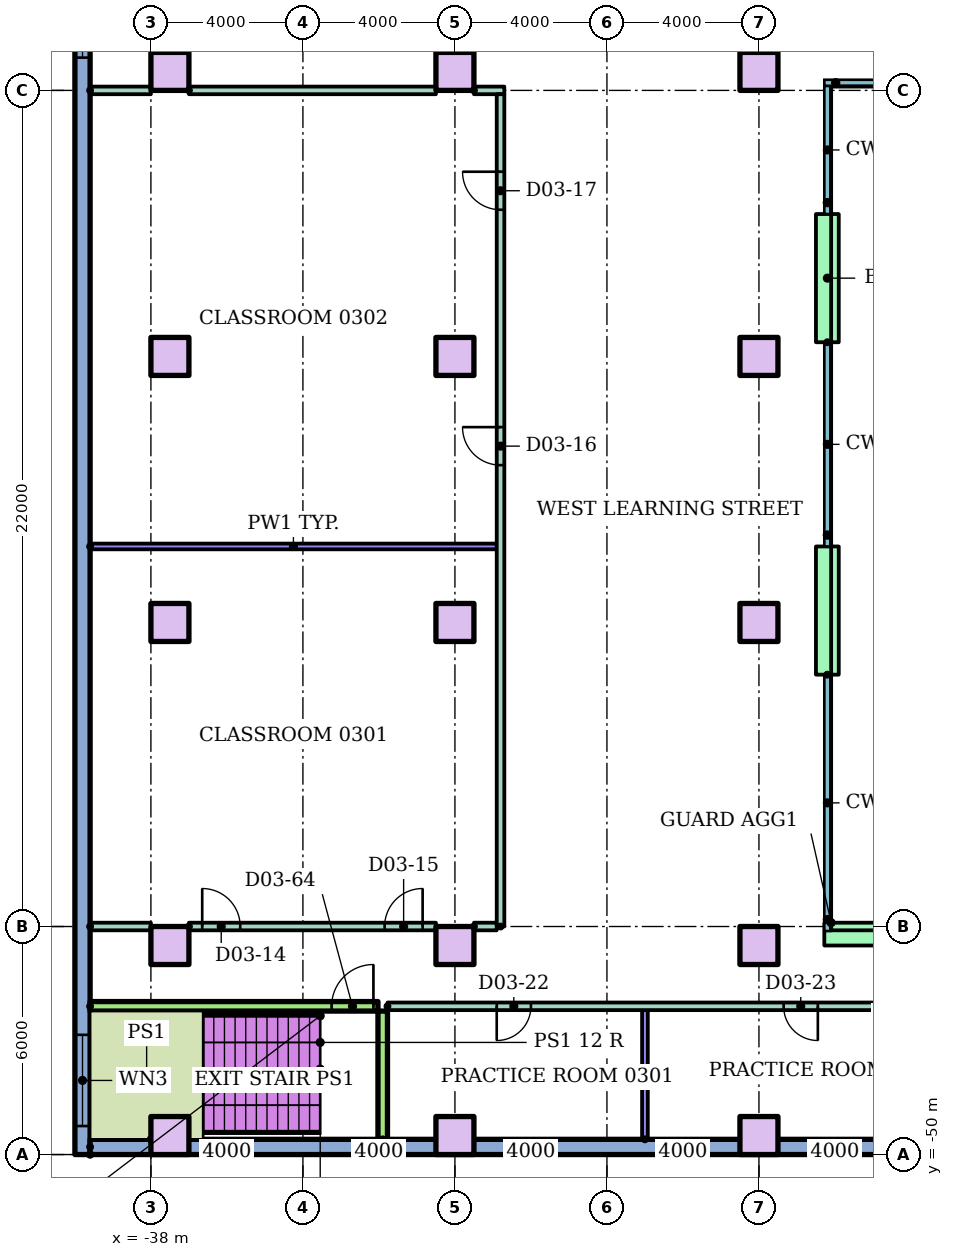
"""IFC4 building model, lengths in metres.
Left out: names, types, materials, properties, quantities, classifications, styles, units other than length and angle.
Written with IfcOpenShell. Run it as: python <this file> out.ifc"""

import sys

from ifc_helpers import new_model, si_unit, direction, frame, frame_2d, origin, origin_2d, place, context, subcontext, project, spatial, rectangle, extrude, element, fill, save


model = new_model("IFC4")
c1 = context("Model", 3, precision=1e-05, world=origin(), true_north=direction((0.0, 1.0)))
c2 = subcontext(c1, "Body", "Model", "MODEL_VIEW")
j1 = project(units=[si_unit("LENGTHUNIT", "METRE"), si_unit("PLANEANGLEUNIT", "RADIAN")], contexts=[c1])
p1 = place(None, origin())
s1 = spatial("IfcSite", under=j1, at=p1, CompositionType="ELEMENT")
p2 = place(p1, origin())
s2 = spatial("IfcBuilding", under=s1, at=p2, CompositionType="ELEMENT")
p3 = place(p2, frame((0.0, 0.0, 14.0)))
s3 = spatial("IfcBuildingStorey", under=s2, at=p3, CompositionType="ELEMENT", Elevation=14.0)
for number, where in (
    (1, (-37.5, -49.5, 0.0)),
    (2, (-30.0, -49.5, 0.0)),
    (3, (-22.0, -49.5, 0.0)),
    (4, (-37.5, -44.5, 0.0)),
    (5, (-30.0, -44.5, 0.0)),
    (6, (-22.0, -44.5, 0.0)),
    (7, (-37.5, -36.0, 0.0)),
    (8, (-30.0, -36.0, 0.0)),
    (9, (-22.0, -36.0, 0.0)),
    (10, (-37.5, -29.0, 0.0)),
    (11, (-30.0, -29.0, 0.0)),
    (12, (-22.0, -29.0, 0.0)),
    (13, (-37.5, -21.5, 0.0)),
    (14, (-30.0, -21.5, 0.0)),
    (15, (-22.0, -21.5, 0.0)),
):
    element("IfcColumn", number, at=place(p3, frame(where)), inside=s3, PredefinedType="COLUMN", context=c2, shape_type="SweptSolid", body=[
        extrude(rectangle(XDim=1.0, YDim=1.0, at=origin_2d()), origin(), (0.0, 0.0, 1.0), 4.0),
    ])
p4 = place(p3, frame((-39.8, 20.0, 0.0), z_axis=(0.0, 0.0, 1.0), x_axis=(0.0, -1.0, 0.0)))
e16 = element("IfcWall", 16, at=p4, inside=s3, PredefinedType="STANDARD", context=c2, shape_type="SweptSolid", body=[
    extrude(rectangle(XDim=70.0, YDim=0.4, at=frame_2d((35.0, 0.0))), origin(), (0.0, 0.0, 1.0), 3.7),
])
p5 = place(p4, frame((1.05, 0.0, 0.9)))
e17 = element("IfcOpeningElement", 17, at=p5, cuts=e16, PredefinedType="OPENING", context=c2, shape_type="SweptSolid", body=[
    extrude(rectangle(XDim=2.4, YDim=2.1, at=frame_2d((1.2, 1.05))), frame((0.0, 0.21, 0.0), z_axis=(0.0, -1.0, 0.0), x_axis=(1.0, 0.0, 0.0)), (0.0, 0.0, 1.0), 0.42),
])
p6 = place(p4, frame((5.55, 0.0, 0.9)))
e18 = element("IfcOpeningElement", 18, at=p6, cuts=e16, PredefinedType="OPENING", context=c2, shape_type="SweptSolid", body=[
    extrude(rectangle(XDim=2.4, YDim=2.1, at=frame_2d((1.2, 1.05))), frame((0.0, 0.21, 0.0), z_axis=(0.0, -1.0, 0.0), x_axis=(1.0, 0.0, 0.0)), (0.0, 0.0, 1.0), 0.42),
])
p7 = place(p4, frame((9.863, 0.0, 0.9)))
e19 = element("IfcOpeningElement", 19, at=p7, cuts=e16, PredefinedType="OPENING", context=c2, shape_type="SweptSolid", body=[
    extrude(rectangle(XDim=2.4, YDim=2.1, at=frame_2d((1.2, 1.05))), frame((0.0, 0.21, 0.0), z_axis=(0.0, -1.0, 0.0), x_axis=(1.0, 0.0, 0.0)), (0.0, 0.0, 1.0), 0.42),
])
p8 = place(p4, frame((13.988, 0.0, 0.9)))
e20 = element("IfcOpeningElement", 20, at=p8, cuts=e16, PredefinedType="OPENING", context=c2, shape_type="SweptSolid", body=[
    extrude(rectangle(XDim=2.4, YDim=2.1, at=frame_2d((1.2, 1.05))), frame((0.0, 0.21, 0.0), z_axis=(0.0, -1.0, 0.0), x_axis=(1.0, 0.0, 0.0)), (0.0, 0.0, 1.0), 0.42),
])
p9 = place(p4, frame((18.113, 0.0, 0.9)))
e21 = element("IfcOpeningElement", 21, at=p9, cuts=e16, PredefinedType="OPENING", context=c2, shape_type="SweptSolid", body=[
    extrude(rectangle(XDim=2.4, YDim=2.1, at=frame_2d((1.2, 1.05))), frame((0.0, 0.21, 0.0), z_axis=(0.0, -1.0, 0.0), x_axis=(1.0, 0.0, 0.0)), (0.0, 0.0, 1.0), 0.42),
])
p10 = place(p4, frame((22.238, 0.0, 0.9)))
e22 = element("IfcOpeningElement", 22, at=p10, cuts=e16, PredefinedType="OPENING", context=c2, shape_type="SweptSolid", body=[
    extrude(rectangle(XDim=2.4, YDim=2.1, at=frame_2d((1.2, 1.05))), frame((0.0, 0.21, 0.0), z_axis=(0.0, -1.0, 0.0), x_axis=(1.0, 0.0, 0.0)), (0.0, 0.0, 1.0), 0.42),
])
p11 = place(p4, frame((26.363, 0.0, 0.9)))
e23 = element("IfcOpeningElement", 23, at=p11, cuts=e16, PredefinedType="OPENING", context=c2, shape_type="SweptSolid", body=[
    extrude(rectangle(XDim=2.4, YDim=2.1, at=frame_2d((1.2, 1.05))), frame((0.0, 0.21, 0.0), z_axis=(0.0, -1.0, 0.0), x_axis=(1.0, 0.0, 0.0)), (0.0, 0.0, 1.0), 0.42),
])
p12 = place(p4, frame((30.488, 0.0, 0.9)))
e24 = element("IfcOpeningElement", 24, at=p12, cuts=e16, PredefinedType="OPENING", context=c2, shape_type="SweptSolid", body=[
    extrude(rectangle(XDim=2.4, YDim=2.1, at=frame_2d((1.2, 1.05))), frame((0.0, 0.21, 0.0), z_axis=(0.0, -1.0, 0.0), x_axis=(1.0, 0.0, 0.0)), (0.0, 0.0, 1.0), 0.42),
])
p13 = place(p4, frame((34.613, 0.0, 0.9)))
e25 = element("IfcOpeningElement", 25, at=p13, cuts=e16, PredefinedType="OPENING", context=c2, shape_type="SweptSolid", body=[
    extrude(rectangle(XDim=2.4, YDim=2.1, at=frame_2d((1.2, 1.05))), frame((0.0, 0.21, 0.0), z_axis=(0.0, -1.0, 0.0), x_axis=(1.0, 0.0, 0.0)), (0.0, 0.0, 1.0), 0.42),
])
p14 = place(p4, frame((38.738, 0.0, 0.9)))
e26 = element("IfcOpeningElement", 26, at=p14, cuts=e16, PredefinedType="OPENING", context=c2, shape_type="SweptSolid", body=[
    extrude(rectangle(XDim=2.4, YDim=2.1, at=frame_2d((1.2, 1.05))), frame((0.0, 0.21, 0.0), z_axis=(0.0, -1.0, 0.0), x_axis=(1.0, 0.0, 0.0)), (0.0, 0.0, 1.0), 0.42),
])
p15 = place(p4, frame((66.85, 0.0, 0.9)))
e27 = element("IfcOpeningElement", 27, at=p15, cuts=e16, PredefinedType="OPENING", context=c2, shape_type="SweptSolid", body=[
    extrude(rectangle(XDim=2.4, YDim=2.1, at=frame_2d((1.2, 1.05))), frame((0.0, 0.21, 0.0), z_axis=(0.0, -1.0, 0.0), x_axis=(1.0, 0.0, 0.0)), (0.0, 0.0, 1.0), 0.42),
])
p16 = place(p3, frame((-39.6, -49.8, 0.0)))
e28 = element("IfcWall", 28, at=p16, inside=s3, PredefinedType="STANDARD", context=c2, shape_type="SweptSolid", body=[
    extrude(rectangle(XDim=79.2, YDim=0.4, at=frame_2d((39.6, 0.0))), origin(), (0.0, 0.0, 1.0), 3.7),
])
p17 = place(p16, frame((21.885, 0.0, 0.9)))
e29 = element("IfcOpeningElement", 29, at=p17, cuts=e28, PredefinedType="OPENING", context=c2, shape_type="SweptSolid", body=[
    extrude(rectangle(XDim=2.4, YDim=2.1, at=frame_2d((1.2, 1.05))), frame((0.0, 0.21, 0.0), z_axis=(0.0, -1.0, 0.0), x_axis=(1.0, 0.0, 0.0)), (0.0, 0.0, 1.0), 0.42),
])
p18 = place(p16, frame((30.135, 0.0, 0.9)))
e30 = element("IfcOpeningElement", 30, at=p18, cuts=e28, PredefinedType="OPENING", context=c2, shape_type="SweptSolid", body=[
    extrude(rectangle(XDim=2.05, YDim=2.1, at=frame_2d((1.025, 1.05))), frame((0.0, 0.21, 0.0), z_axis=(0.0, -1.0, 0.0), x_axis=(1.0, 0.0, 0.0)), (0.0, 0.0, 1.0), 0.42),
])
p19 = place(p16, frame((38.135, 0.0, 0.9)))
e31 = element("IfcOpeningElement", 31, at=p19, cuts=e28, PredefinedType="OPENING", context=c2, shape_type="SweptSolid", body=[
    extrude(rectangle(XDim=2.4, YDim=2.1, at=frame_2d((1.2, 1.05))), frame((0.0, 0.21, 0.0), z_axis=(0.0, -1.0, 0.0), x_axis=(1.0, 0.0, 0.0)), (0.0, 0.0, 1.0), 0.42),
])
p20 = place(p16, frame((47.015, 0.0, 0.9)))
e32 = element("IfcOpeningElement", 32, at=p20, cuts=e28, PredefinedType="OPENING", context=c2, shape_type="SweptSolid", body=[
    extrude(rectangle(XDim=1.52, YDim=2.1, at=frame_2d((0.76, 1.05))), frame((0.0, 0.21, 0.0), z_axis=(0.0, -1.0, 0.0), x_axis=(1.0, 0.0, 0.0)), (0.0, 0.0, 1.0), 0.42),
])
p21 = place(p16, frame((54.135, 0.0, 0.9)))
e33 = element("IfcOpeningElement", 33, at=p21, cuts=e28, PredefinedType="OPENING", context=c2, shape_type="SweptSolid", body=[
    extrude(rectangle(XDim=2.4, YDim=2.1, at=frame_2d((1.2, 1.05))), frame((0.0, 0.21, 0.0), z_axis=(0.0, -1.0, 0.0), x_axis=(1.0, 0.0, 0.0)), (0.0, 0.0, 1.0), 0.42),
])
p22 = place(p3, frame((-18.0, -44.2, 0.0), z_axis=(0.0, 0.0, 1.0), x_axis=(-1.0, 0.0, 0.0)))
e34 = element("IfcWall", 34, at=p22, inside=s3, PredefinedType="STANDARD", context=c2, shape_type="SweptSolid", body=[
    extrude(rectangle(XDim=2.28, YDim=0.6, at=frame_2d((1.14, 0.0))), origin(), (0.0, 0.0, 1.0), 3.7),
])
for number, where, z_axis, x_axis in (
    (35, (-20.2, -37.373, 0.0), (0.0, 0.0, 1.0), (0.0, 1.0, 0.0)),
    (36, (-20.2, -28.627, 0.0), (0.0, 0.0, 1.0), (0.0, 1.0, 0.0)),
):
    element("IfcWall", number, at=place(p3, frame(where, z_axis=z_axis, x_axis=x_axis)), inside=s3, PredefinedType="STANDARD", context=c2, shape_type="SweptSolid", body=[
        extrude(rectangle(XDim=3.373, YDim=0.6, at=frame_2d((1.687, 0.0))), origin(), (0.0, 0.0, 1.0), 3.7),
    ])
p23 = place(p3, frame((-31.775, -46.1, 0.0)))
e37 = element("IfcWall", 37, at=p23, inside=s3, PredefinedType="PARTITIONING", context=c2, shape_type="SweptSolid", body=[
    extrude(rectangle(XDim=19.65, YDim=0.2, at=frame_2d((9.825, 0.0))), origin(), (0.0, 0.0, 1.0), 3.7),
])
p24 = place(p23, frame((2.875, 0.0, 0.0)))
e38 = element("IfcOpeningElement", 38, at=p24, cuts=e37, PredefinedType="OPENING", context=c2, shape_type="SweptSolid", body=[
    extrude(rectangle(XDim=0.9, YDim=2.1, at=frame_2d((0.45, 1.05))), frame((0.0, 0.11, 0.0), z_axis=(0.0, -1.0, 0.0), x_axis=(1.0, 0.0, 0.0)), (0.0, 0.0, 1.0), 0.22),
])
p25 = place(p23, frame((10.425, 0.0, 0.0)))
e39 = element("IfcOpeningElement", 39, at=p25, cuts=e37, PredefinedType="OPENING", context=c2, shape_type="SweptSolid", body=[
    extrude(rectangle(XDim=0.9, YDim=2.1, at=frame_2d((0.45, 1.05))), frame((0.0, 0.11, 0.0), z_axis=(0.0, -1.0, 0.0), x_axis=(1.0, 0.0, 0.0)), (0.0, 0.0, 1.0), 0.22),
])
p26 = place(p23, frame((16.075, 0.0, 0.0)))
e40 = element("IfcOpeningElement", 40, at=p26, cuts=e37, PredefinedType="OPENING", context=c2, shape_type="SweptSolid", body=[
    extrude(rectangle(XDim=0.9, YDim=2.1, at=frame_2d((0.45, 1.05))), frame((0.0, 0.11, 0.0), z_axis=(0.0, -1.0, 0.0), x_axis=(1.0, 0.0, 0.0)), (0.0, 0.0, 1.0), 0.22),
])
p27 = place(p3, frame((-39.6, -46.1, 0.0)))
e41 = element("IfcWall", 41, at=p27, inside=s3, PredefinedType="SOLIDWALL", context=c2, shape_type="SweptSolid", body=[
    extrude(rectangle(XDim=7.575, YDim=0.25, at=frame_2d((3.788, 0.0))), origin(), (0.0, 0.0, 1.0), 3.7),
])
p28 = place(p27, frame((6.355, 0.0, 0.0)))
e42 = element("IfcOpeningElement", 42, at=p28, cuts=e41, PredefinedType="OPENING", context=c2, shape_type="SweptSolid", body=[
    extrude(rectangle(XDim=1.1, YDim=2.1, at=frame_2d((0.55, 1.05))), frame((0.0, 0.135, 0.0), z_axis=(0.0, -1.0, 0.0), x_axis=(1.0, 0.0, 0.0)), (0.0, 0.0, 1.0), 0.27),
])
p29 = place(p3, frame((-39.6, -44.0, 0.0)))
e43 = element("IfcWall", 43, at=p29, inside=s3, PredefinedType="PARTITIONING", context=c2, shape_type="SweptSolid", body=[
    extrude(rectangle(XDim=1.6, YDim=0.2, at=frame_2d((0.8, 0.0))), origin(), (0.0, 0.0, 1.0), 3.7),
])
p30 = place(p3, frame((-37.0, -44.0, 0.0)))
e44 = element("IfcWall", 44, at=p30, inside=s3, PredefinedType="PARTITIONING", context=c2, shape_type="SweptSolid", body=[
    extrude(rectangle(XDim=6.5, YDim=0.2, at=frame_2d((3.25, 0.0))), origin(), (0.0, 0.0, 1.0), 3.7),
])
p31 = place(p30, frame((0.35, 0.0, 0.0)))
e45 = element("IfcOpeningElement", 45, at=p31, cuts=e44, PredefinedType="OPENING", context=c2, shape_type="SweptSolid", body=[
    extrude(rectangle(XDim=1.0, YDim=2.1, at=frame_2d((0.5, 1.05))), frame((0.0, 0.11, 0.0), z_axis=(0.0, -1.0, 0.0), x_axis=(1.0, 0.0, 0.0)), (0.0, 0.0, 1.0), 0.22),
])
p32 = place(p30, frame((5.15, 0.0, 0.0)))
e46 = element("IfcOpeningElement", 46, at=p32, cuts=e44, PredefinedType="OPENING", context=c2, shape_type="SweptSolid", body=[
    extrude(rectangle(XDim=1.0, YDim=2.1, at=frame_2d((0.5, 1.05))), frame((0.0, 0.11, 0.0), z_axis=(0.0, -1.0, 0.0), x_axis=(1.0, 0.0, 0.0)), (0.0, 0.0, 1.0), 0.22),
])
p33 = place(p3, frame((-29.5, -44.0, 0.0)))
e47 = element("IfcWall", 47, at=p33, inside=s3, PredefinedType="PARTITIONING", context=c2, shape_type="SweptSolid", body=[
    extrude(rectangle(XDim=0.6, YDim=0.2, at=frame_2d((0.3, 0.0))), origin(), (0.0, 0.0, 1.0), 3.7),
])
p34 = place(p3, frame((-39.6, -34.0, 0.0)))
e48 = element("IfcWall", 48, at=p34, inside=s3, PredefinedType="PARTITIONING", context=c2, shape_type="SweptSolid", body=[
    extrude(rectangle(XDim=10.7, YDim=0.15, at=frame_2d((5.35, 0.0))), origin(), (0.0, 0.0, 1.0), 3.7),
])
p35 = place(p3, frame((-39.6, -22.0, 0.0)))
e49 = element("IfcWall", 49, at=p35, inside=s3, PredefinedType="PARTITIONING", context=c2, shape_type="SweptSolid", body=[
    extrude(rectangle(XDim=1.6, YDim=0.2, at=frame_2d((0.8, 0.0))), origin(), (0.0, 0.0, 1.0), 3.7),
])
p36 = place(p3, frame((-37.0, -22.0, 0.0)))
e50 = element("IfcWall", 50, at=p36, inside=s3, PredefinedType="PARTITIONING", context=c2, shape_type="SweptSolid", body=[
    extrude(rectangle(XDim=6.5, YDim=0.2, at=frame_2d((3.25, 0.0))), origin(), (0.0, 0.0, 1.0), 3.7),
])
p37 = place(p3, frame((-29.5, -22.0, 0.0)))
e51 = element("IfcWall", 51, at=p37, inside=s3, PredefinedType="PARTITIONING", context=c2, shape_type="SweptSolid", body=[
    extrude(rectangle(XDim=0.8, YDim=0.2, at=frame_2d((0.4, 0.0))), origin(), (0.0, 0.0, 1.0), 3.7),
])
p38 = place(p3, frame((-31.9, -49.6, 0.0), z_axis=(0.0, 0.0, 1.0), x_axis=(0.0, 1.0, 0.0)))
e52 = element("IfcWall", 52, at=p38, inside=s3, PredefinedType="SOLIDWALL", context=c2, shape_type="SweptSolid", body=[
    extrude(rectangle(XDim=3.375, YDim=0.25, at=frame_2d((1.688, 0.0))), origin(), (0.0, 0.0, 1.0), 3.7),
])
p39 = place(p3, frame((-28.8, -44.0, 0.0), z_axis=(0.0, 0.0, 1.0), x_axis=(0.0, 1.0, 0.0)))
e53 = element("IfcWall", 53, at=p39, inside=s3, PredefinedType="PARTITIONING", context=c2, shape_type="SweptSolid", body=[
    extrude(rectangle(XDim=21.9, YDim=0.2, at=frame_2d((10.95, 0.0))), origin(), (0.0, 0.0, 1.0), 3.7),
])
p40 = place(p39, frame((12.14, 0.0, 0.0)))
e54 = element("IfcOpeningElement", 54, at=p40, cuts=e53, PredefinedType="OPENING", context=c2, shape_type="SweptSolid", body=[
    extrude(rectangle(XDim=1.0, YDim=2.1, at=frame_2d((0.5, 1.05))), frame((0.0, 0.11, 0.0), z_axis=(0.0, -1.0, 0.0), x_axis=(1.0, 0.0, 0.0)), (0.0, 0.0, 1.0), 0.22),
])
p41 = place(p39, frame((18.86, 0.0, 0.0)))
e55 = element("IfcOpeningElement", 55, at=p41, cuts=e53, PredefinedType="OPENING", context=c2, shape_type="SweptSolid", body=[
    extrude(rectangle(XDim=1.0, YDim=2.1, at=frame_2d((0.5, 1.05))), frame((0.0, 0.11, 0.0), z_axis=(0.0, -1.0, 0.0), x_axis=(1.0, 0.0, 0.0)), (0.0, 0.0, 1.0), 0.22),
])
p42 = place(p3, frame((-25.0, -49.6, 0.0), z_axis=(0.0, 0.0, 1.0), x_axis=(0.0, 1.0, 0.0)))
e56 = element("IfcWall", 56, at=p42, inside=s3, PredefinedType="PARTITIONING", context=c2, shape_type="SweptSolid", body=[
    extrude(rectangle(XDim=3.4, YDim=0.15, at=frame_2d((1.7, 0.0))), origin(), (0.0, 0.0, 1.0), 3.7),
])
p43 = place(p14, origin())
e57 = element("IfcWindow", 57, at=p43, inside=s3, PartitioningType="SINGLE_PANEL", PredefinedType="WINDOW", context=c2, shape_type="SweptSolid", body=[
    extrude(rectangle(XDim=2.4, YDim=2.1, at=frame_2d((1.2, 1.05))), frame((0.0, 0.03, 0.0), z_axis=(0.0, -1.0, 0.0), x_axis=(1.0, 0.0, 0.0)), (0.0, 0.0, 1.0), 0.06),
])
fill(e26, e57)
p44 = place(p15, origin())
e58 = element("IfcWindow", 58, at=p44, inside=s3, PartitioningType="SINGLE_PANEL", PredefinedType="WINDOW", context=c2, shape_type="SweptSolid", body=[
    extrude(rectangle(XDim=2.4, YDim=2.1, at=frame_2d((1.2, 1.05))), frame((0.0, 0.03, 0.0), z_axis=(0.0, -1.0, 0.0), x_axis=(1.0, 0.0, 0.0)), (0.0, 0.0, 1.0), 0.06),
])
fill(e27, e58)
p45 = place(p31, origin())
e59 = element("IfcDoor", 59, at=p45, inside=s3, OperationType="SINGLE_SWING_LEFT", PredefinedType="DOOR", context=c2, shape_type="SweptSolid", body=[
    extrude(rectangle(XDim=1.0, YDim=2.1, at=frame_2d((0.5, 1.05))), frame((0.0, 0.025, 0.0), z_axis=(0.0, -1.0, 0.0), x_axis=(1.0, 0.0, 0.0)), (0.0, 0.0, 1.0), 0.05),
])
fill(e45, e59)
p46 = place(p32, origin())
e60 = element("IfcDoor", 60, at=p46, inside=s3, OperationType="SINGLE_SWING_RIGHT", PredefinedType="DOOR", context=c2, shape_type="SweptSolid", body=[
    extrude(rectangle(XDim=1.0, YDim=2.1, at=frame_2d((0.5, 1.05))), frame((0.0, 0.025, 0.0), z_axis=(0.0, -1.0, 0.0), x_axis=(1.0, 0.0, 0.0)), (0.0, 0.0, 1.0), 0.05),
])
fill(e46, e60)
p47 = place(p40, origin())
e61 = element("IfcDoor", 61, at=p47, inside=s3, OperationType="SINGLE_SWING_RIGHT", PredefinedType="DOOR", context=c2, shape_type="SweptSolid", body=[
    extrude(rectangle(XDim=1.0, YDim=2.1, at=frame_2d((0.5, 1.05))), frame((0.0, 0.025, 0.0), z_axis=(0.0, -1.0, 0.0), x_axis=(1.0, 0.0, 0.0)), (0.0, 0.0, 1.0), 0.05),
])
fill(e54, e61)
p48 = place(p41, origin())
e62 = element("IfcDoor", 62, at=p48, inside=s3, OperationType="SINGLE_SWING_RIGHT", PredefinedType="DOOR", context=c2, shape_type="SweptSolid", body=[
    extrude(rectangle(XDim=1.0, YDim=2.1, at=frame_2d((0.5, 1.05))), frame((0.0, 0.025, 0.0), z_axis=(0.0, -1.0, 0.0), x_axis=(1.0, 0.0, 0.0)), (0.0, 0.0, 1.0), 0.05),
])
fill(e55, e62)
p49 = place(p24, frame((0.9, 0.0, 0.0), z_axis=(0.0, 0.0, 1.0), x_axis=(-1.0, 0.0, 0.0)))
e63 = element("IfcDoor", 63, at=p49, inside=s3, OperationType="SINGLE_SWING_LEFT", PredefinedType="DOOR", context=c2, shape_type="SweptSolid", body=[
    extrude(rectangle(XDim=0.9, YDim=2.1, at=frame_2d((0.45, 1.05))), frame((0.0, 0.025, 0.0), z_axis=(0.0, -1.0, 0.0), x_axis=(1.0, 0.0, 0.0)), (0.0, 0.0, 1.0), 0.05),
])
fill(e38, e63)
p50 = place(p25, frame((0.9, 0.0, 0.0), z_axis=(0.0, 0.0, 1.0), x_axis=(-1.0, 0.0, 0.0)))
e64 = element("IfcDoor", 64, at=p50, inside=s3, OperationType="SINGLE_SWING_RIGHT", PredefinedType="DOOR", context=c2, shape_type="SweptSolid", body=[
    extrude(rectangle(XDim=0.9, YDim=2.1, at=frame_2d((0.45, 1.05))), frame((0.0, 0.025, 0.0), z_axis=(0.0, -1.0, 0.0), x_axis=(1.0, 0.0, 0.0)), (0.0, 0.0, 1.0), 0.05),
])
fill(e39, e64)
p51 = place(p28, origin())
e65 = element("IfcDoor", 65, at=p51, inside=s3, OperationType="SINGLE_SWING_RIGHT", PredefinedType="DOOR", context=c2, shape_type="SweptSolid", body=[
    extrude(rectangle(XDim=1.1, YDim=2.1, at=frame_2d((0.55, 1.05))), frame((0.0, 0.025, 0.0), z_axis=(0.0, -1.0, 0.0), x_axis=(1.0, 0.0, 0.0)), (0.0, 0.0, 1.0), 0.05),
])
fill(e42, e65)
save(model, sys.argv[1])
